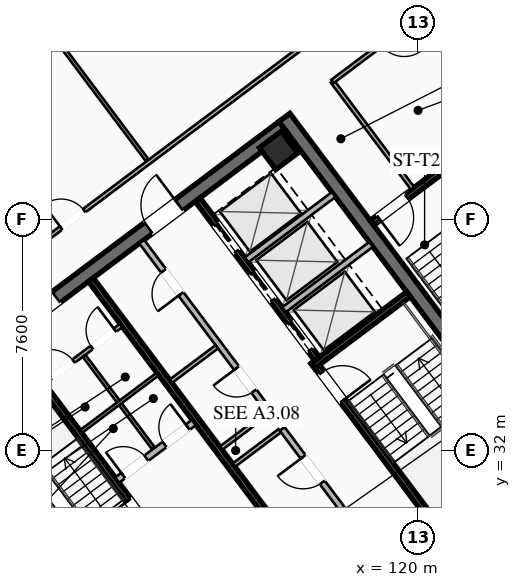
"""IFC4 building model, lengths in metres.
Left out: names, types, materials, properties, quantities, classifications, styles, units other than length and angle.
Written with IfcOpenShell. Run it as: python <this file> out.ifc"""

import sys

from ifc_helpers import new_model, si_unit, direction, frame, frame_2d, origin, origin_2d, place, context, subcontext, project, spatial, rectangle, hollow_rectangle, extrude, element, fill, save


model = new_model("IFC4")
c1 = context("Model", 3, precision=1e-05, world=origin(), true_north=direction((0.0, 1.0)))
c2 = subcontext(c1, "Body", "Model", "MODEL_VIEW")
j1 = project(units=[si_unit("LENGTHUNIT", "METRE"), si_unit("PLANEANGLEUNIT", "RADIAN")], contexts=[c1])
p1 = place(None, origin())
s1 = spatial("IfcSite", under=j1, at=p1, CompositionType="ELEMENT")
p2 = place(p1, origin())
s2 = spatial("IfcBuilding", under=s1, at=p2, CompositionType="ELEMENT")
p3 = place(p2, frame((0.0, 0.0, 204.2)))
s3 = spatial("IfcBuildingStorey", under=s2, at=p3, CompositionType="ELEMENT", Elevation=204.2)
for number, where, z_axis, x_axis in (
    (1, (112.396, 21.047, 0.0), (0.0, 0.0, 1.0), (-0.6, 0.8, 0.0)),
    (2, (115.604, 42.953, 0.0), (0.0, 0.0, 1.0), (0.6, -0.8, 0.0)),
):
    element("IfcWall", number, at=place(p3, frame(where, z_axis=z_axis, x_axis=x_axis)), inside=s3, PredefinedType="SHEAR", context=c2, shape_type="SweptSolid", body=[
        extrude(rectangle(XDim=15.6, YDim=0.45, at=frame_2d((7.8, 0.0))), origin(), (0.0, 0.0, 1.0), 3.55),
    ])
p4 = place(p3, frame((124.649, 30.518, 0.0), z_axis=(0.0, 0.0, 1.0), x_axis=(-0.8, -0.6, 0.0)))
e3 = element("IfcWall", 3, at=p4, inside=s3, PredefinedType="SHEAR", context=c2, shape_type="SweptSolid", body=[
    extrude(rectangle(XDim=15.26, YDim=0.45, at=frame_2d((7.63, 0.0))), origin(), (0.0, 0.0, 1.0), 3.55),
])
p5 = place(p4, frame((9.33, 0.0, 0.0)))
e4 = element("IfcOpeningElement", 4, at=p5, cuts=e3, PredefinedType="OPENING", context=c2, shape_type="SweptSolid", body=[
    extrude(rectangle(XDim=1.25, YDim=2.25, at=frame_2d((0.625, 1.125))), frame((0.0, 0.235, 0.0), z_axis=(0.0, -1.0, 0.0), x_axis=(1.0, 0.0, 0.0)), (0.0, 0.0, 1.0), 0.47),
])
p6 = place(p4, frame((4.28, 0.0, 0.0)))
e5 = element("IfcOpeningElement", 5, at=p6, cuts=e3, PredefinedType="OPENING", context=c2, shape_type="SweptSolid", body=[
    extrude(rectangle(XDim=1.25, YDim=2.25, at=frame_2d((0.625, 1.125))), frame((0.0, 0.235, 0.0), z_axis=(0.0, -1.0, 0.0), x_axis=(1.0, 0.0, 0.0)), (0.0, 0.0, 1.0), 0.47),
])
p7 = place(p3, frame((103.351, 33.482, 0.0), z_axis=(0.0, 0.0, 1.0), x_axis=(0.8, 0.6, 0.0)))
e6 = element("IfcWall", 6, at=p7, inside=s3, PredefinedType="SHEAR", context=c2, shape_type="SweptSolid", body=[
    extrude(rectangle(XDim=15.26, YDim=0.45, at=frame_2d((7.63, 0.0))), origin(), (0.0, 0.0, 1.0), 3.55),
])
p8 = place(p7, frame((4.68, 0.0, 0.0)))
e7 = element("IfcOpeningElement", 7, at=p8, cuts=e6, PredefinedType="OPENING", context=c2, shape_type="SweptSolid", body=[
    extrude(rectangle(XDim=1.25, YDim=2.25, at=frame_2d((0.625, 1.125))), frame((0.0, 0.235, 0.0), z_axis=(0.0, -1.0, 0.0), x_axis=(1.0, 0.0, 0.0)), (0.0, 0.0, 1.0), 0.47),
])
p9 = place(p7, frame((9.73, 0.0, 0.0)))
e8 = element("IfcOpeningElement", 8, at=p9, cuts=e6, PredefinedType="OPENING", context=c2, shape_type="SweptSolid", body=[
    extrude(rectangle(XDim=1.25, YDim=2.25, at=frame_2d((0.625, 1.125))), frame((0.0, 0.235, 0.0), z_axis=(0.0, -1.0, 0.0), x_axis=(1.0, 0.0, 0.0)), (0.0, 0.0, 1.0), 0.47),
])
p10 = place(p3, frame((115.41, 41.87, 0.0), z_axis=(0.0, 0.0, 1.0), x_axis=(0.799999996291, 0.600000004945, 0.0)))
e9 = element("IfcColumn", 9, at=p10, inside=s3, PredefinedType="COLUMN", context=c2, shape_type="SweptSolid", body=[
    extrude(hollow_rectangle(XDim=0.9, YDim=0.9, WallThickness=0.04, at=origin_2d()), origin(), (0.0, 0.0, 1.0), 3.37),
])
p11 = place(p3, frame((111.44, 29.08, 0.0), z_axis=(0.0, 0.0, 1.0), x_axis=(-0.59999041401, 0.800007189403, 0.0)))
e10 = element("IfcWall", 10, at=p11, inside=s3, PredefinedType="SHEAR", context=c2, shape_type="SweptSolid", body=[
    extrude(rectangle(XDim=8.15, YDim=0.2, at=frame_2d((4.075, 0.0))), origin(), (0.0, 0.0, 1.0), 3.37),
])
p12 = place(p11, frame((0.45, 0.0, 0.0)))
e11 = element("IfcOpeningElement", 11, at=p12, cuts=e10, PredefinedType="OPENING", context=c2, shape_type="SweptSolid", body=[
    extrude(rectangle(XDim=1.15, YDim=2.2, at=frame_2d((0.575, 1.1))), frame((0.0, 0.11, 0.0), z_axis=(0.0, -1.0, 0.0), x_axis=(1.0, 0.0, 0.0)), (0.0, 0.0, 1.0), 0.22),
])
p13 = place(p3, frame((116.56, 34.92, 0.0), z_axis=(0.0, 0.0, 1.0), x_axis=(0.59999041401, -0.800007189403, 0.0)))
e12 = element("IfcWall", 12, at=p13, inside=s3, PredefinedType="SHEAR", context=c2, shape_type="SweptSolid", body=[
    extrude(rectangle(XDim=8.15, YDim=0.2, at=frame_2d((4.075, 0.0))), origin(), (0.0, 0.0, 1.0), 3.37),
])
p14 = place(p13, frame((0.45, 0.0, 0.0)))
e13 = element("IfcOpeningElement", 13, at=p14, cuts=e12, PredefinedType="OPENING", context=c2, shape_type="SweptSolid", body=[
    extrude(rectangle(XDim=1.15, YDim=2.2, at=frame_2d((0.575, 1.1))), frame((0.0, 0.11, 0.0), z_axis=(0.0, -1.0, 0.0), x_axis=(1.0, 0.0, 0.0)), (0.0, 0.0, 1.0), 0.22),
])
p15 = place(p3, frame((116.54, 34.78, 0.0), z_axis=(0.0, 0.0, 1.0), x_axis=(0.800014909178, 0.599980120581, 0.0)))
e14 = element("IfcWall", 14, at=p15, inside=s3, PredefinedType="SHEAR", context=c2, shape_type="SweptSolid", body=[
    extrude(rectangle(XDim=3.93, YDim=0.2, at=frame_2d((1.965, 0.0))), origin(), (0.0, 0.0, 1.0), 3.37),
])
p16 = place(p3, frame((118.058, 25.856, 0.0), z_axis=(0.0, 0.0, 1.0), x_axis=(-0.600002657301, 0.799998007018, 0.0)))
e15 = element("IfcWall", 15, at=p16, inside=s3, PredefinedType="SHEAR", context=c2, shape_type="SweptSolid", body=[
    extrude(rectangle(XDim=14.7, YDim=0.2, at=frame_2d((7.35, 0.0))), origin(), (0.0, 0.0, 1.0), 3.37),
])
p17 = place(p3, frame((110.104, 31.028, 0.0), z_axis=(0.0, 0.0, 1.0), x_axis=(0.800018601094, 0.59997519774, 0.0)))
e16 = element("IfcWall", 16, at=p17, inside=s3, PredefinedType="SOLIDWALL", context=c2, shape_type="SweptSolid", body=[
    extrude(rectangle(XDim=3.15, YDim=0.22, at=frame_2d((1.575, 0.0))), origin(), (0.0, 0.0, 1.0), 2.723),
])
p18 = place(p17, frame((0.25, 0.0, 0.0)))
e17 = element("IfcOpeningElement", 17, at=p18, cuts=e16, PredefinedType="OPENING", context=c2, shape_type="SweptSolid", body=[
    extrude(rectangle(XDim=0.95, YDim=2.05, at=frame_2d((0.475, 1.025))), frame((0.0, 0.12, 0.0), z_axis=(0.0, -1.0, 0.0), x_axis=(1.0, 0.0, 0.0)), (0.0, 0.0, 1.0), 0.24),
])
p19 = place(p17, frame((1.95, 0.0, 0.0)))
e18 = element("IfcOpeningElement", 18, at=p19, cuts=e16, PredefinedType="OPENING", context=c2, shape_type="SweptSolid", body=[
    extrude(rectangle(XDim=0.95, YDim=2.05, at=frame_2d((0.475, 1.025))), frame((0.0, 0.12, 0.0), z_axis=(0.0, -1.0, 0.0), x_axis=(1.0, 0.0, 0.0)), (0.0, 0.0, 1.0), 0.24),
])
p20 = place(p3, frame((112.75, 40.25, 0.0), z_axis=(0.0, 0.0, 1.0), x_axis=(0.599994036198, -0.800004472816, 0.0)))
e19 = element("IfcWall", 19, at=p20, inside=s3, PredefinedType="SHEAR", context=c2, shape_type="SweptSolid", body=[
    extrude(rectangle(XDim=6.55, YDim=0.2, at=frame_2d((3.275, 0.0))), origin(), (0.0, 0.0, 1.0), 3.37),
])
p21 = place(p20, frame((5.075, 0.0, 0.0)))
e20 = element("IfcOpeningElement", 20, at=p21, cuts=e19, PredefinedType="OPENING", context=c2, shape_type="SweptSolid", body=[
    extrude(rectangle(XDim=1.1, YDim=2.2, at=frame_2d((0.55, 1.1))), frame((0.0, 0.11, 0.0), z_axis=(0.0, -1.0, 0.0), x_axis=(1.0, 0.0, 0.0)), (0.0, 0.0, 1.0), 0.22),
])
p22 = place(p20, frame((3.025, 0.0, 0.0)))
e21 = element("IfcOpeningElement", 21, at=p22, cuts=e19, PredefinedType="OPENING", context=c2, shape_type="SweptSolid", body=[
    extrude(rectangle(XDim=1.1, YDim=2.2, at=frame_2d((0.55, 1.1))), frame((0.0, 0.11, 0.0), z_axis=(0.0, -1.0, 0.0), x_axis=(1.0, 0.0, 0.0)), (0.0, 0.0, 1.0), 0.22),
])
p23 = place(p20, frame((1.025, 0.0, 0.0)))
e22 = element("IfcOpeningElement", 22, at=p23, cuts=e19, PredefinedType="OPENING", context=c2, shape_type="SweptSolid", body=[
    extrude(rectangle(XDim=1.1, YDim=2.2, at=frame_2d((0.55, 1.1))), frame((0.0, 0.11, 0.0), z_axis=(0.0, -1.0, 0.0), x_axis=(1.0, 0.0, 0.0)), (0.0, 0.0, 1.0), 0.22),
])
for number, where, z_axis, x_axis in (
    (23, (115.59, 36.63, 0.0), (0.0, 0.0, 1.0), (0.8, 0.6, 0.0)),
    (24, (114.36, 38.27, 0.0), (0.0, 0.0, 1.0), (0.8, 0.6, 0.0)),
):
    element("IfcWall", number, at=place(p3, frame(where, z_axis=z_axis, x_axis=x_axis)), inside=s3, PredefinedType="SOLIDWALL", context=c2, shape_type="SweptSolid", body=[
        extrude(rectangle(XDim=3.58, YDim=0.2, at=frame_2d((1.79, 0.0))), origin(), (0.0, 0.0, 1.0), 3.37),
    ])
p24 = place(p3, frame((107.71, 34.22, 0.0), z_axis=(0.0, 0.0, 1.0), x_axis=(0.799981399002, 0.60002480053, 0.0)))
e25 = element("IfcWall", 25, at=p24, inside=s3, PredefinedType="PARTITIONING", context=c2, shape_type="SweptSolid", body=[
    extrude(rectangle(XDim=3.15, YDim=0.135, at=frame_2d((1.575, 0.0))), origin(), (0.0, 0.0, 1.0), 2.723),
])
p25 = place(p24, frame((0.25, 0.0, 0.0)))
e26 = element("IfcOpeningElement", 26, at=p25, cuts=e25, PredefinedType="OPENING", context=c2, shape_type="SweptSolid", body=[
    extrude(rectangle(XDim=0.95, YDim=2.05, at=frame_2d((0.475, 1.025))), frame((0.0, 0.077, 0.0), z_axis=(0.0, -1.0, 0.0), x_axis=(1.0, 0.0, 0.0)), (0.0, 0.0, 1.0), 0.155),
])
p26 = place(p24, frame((1.95, 0.0, 0.0)))
e27 = element("IfcOpeningElement", 27, at=p26, cuts=e25, PredefinedType="OPENING", context=c2, shape_type="SweptSolid", body=[
    extrude(rectangle(XDim=0.95, YDim=2.05, at=frame_2d((0.475, 1.025))), frame((0.0, 0.077, 0.0), z_axis=(0.0, -1.0, 0.0), x_axis=(1.0, 0.0, 0.0)), (0.0, 0.0, 1.0), 0.155),
])
p27 = place(p3, frame((111.296, 32.072, 0.0), z_axis=(0.0, 0.0, 1.0), x_axis=(-0.59995887973, 0.800030838552, 0.0)))
e28 = element("IfcWall", 28, at=p27, inside=s3, PredefinedType="PARTITIONING", context=c2, shape_type="SweptSolid", body=[
    extrude(rectangle(XDim=3.8, YDim=0.11, at=frame_2d((1.9, 0.0))), origin(), (0.0, 0.0, 1.0), 2.723),
])
p28 = place(p3, frame((108.91, 32.62, 0.0), z_axis=(0.0, 0.0, 1.0), x_axis=(0.800018601094, 0.59997519774, 0.0)))
e29 = element("IfcWall", 29, at=p28, inside=s3, PredefinedType="PARTITIONING", context=c2, shape_type="SweptSolid", body=[
    extrude(rectangle(XDim=3.15, YDim=0.11, at=frame_2d((1.575, 0.0))), origin(), (0.0, 0.0, 1.0), 2.723),
])
p29 = place(p3, frame((119.73, 27.11, 0.0), z_axis=(0.0, 0.0, 1.0), x_axis=(-0.600005580459, 0.799995814625, 0.0)))
e30 = element("IfcWall", 30, at=p29, inside=s3, PredefinedType="SOLIDWALL", context=c2, shape_type="SweptSolid", body=[
    extrude(rectangle(XDim=7.0, YDim=0.2, at=frame_2d((3.5, 0.0))), origin(), (0.0, 0.0, 1.0), 2.723),
])
p30 = place(p29, frame((0.85, 0.0, 0.0)))
e31 = element("IfcOpeningElement", 31, at=p30, cuts=e30, PredefinedType="OPENING", context=c2, shape_type="SweptSolid", body=[
    extrude(rectangle(XDim=0.95, YDim=2.05, at=frame_2d((0.475, 1.025))), frame((0.0, 0.11, 0.0), z_axis=(0.0, -1.0, 0.0), x_axis=(1.0, 0.0, 0.0)), (0.0, 0.0, 1.0), 0.22),
])
p31 = place(p29, frame((4.8, 0.0, 0.0)))
e32 = element("IfcOpeningElement", 32, at=p31, cuts=e30, PredefinedType="OPENING", context=c2, shape_type="SweptSolid", body=[
    extrude(rectangle(XDim=1.05, YDim=2.2, at=frame_2d((0.525, 1.1))), frame((0.0, 0.11, 0.0), z_axis=(0.0, -1.0, 0.0), x_axis=(1.0, 0.0, 0.0)), (0.0, 0.0, 1.0), 0.22),
])
p32 = place(p3, frame((113.946, 31.522, 0.0), z_axis=(0.0, 0.0, 1.0), x_axis=(0.8, 0.6, 0.0)))
e33 = element("IfcWall", 33, at=p32, inside=s3, PredefinedType="PARTITIONING", context=c2, shape_type="SweptSolid", body=[
    extrude(rectangle(XDim=1.88, YDim=0.135, at=frame_2d((0.94, 0.0))), origin(), (0.0, 0.0, 1.0), 2.723),
])
p33 = place(p3, frame((115.11, 33.27, 0.0), z_axis=(0.0, 0.0, 1.0), x_axis=(-0.600011160345, 0.79999162962, 0.0)))
e34 = element("IfcWall", 34, at=p33, inside=s3, PredefinedType="SOLIDWALL", context=c2, shape_type="SweptSolid", body=[
    extrude(rectangle(XDim=7.0, YDim=0.2, at=frame_2d((3.5, 0.0))), origin(), (0.0, 0.0, 1.0), 2.723),
])
p34 = place(p33, frame((0.85, 0.0, 0.0)))
e35 = element("IfcOpeningElement", 35, at=p34, cuts=e34, PredefinedType="OPENING", context=c2, shape_type="SweptSolid", body=[
    extrude(rectangle(XDim=0.95, YDim=2.05, at=frame_2d((0.475, 1.025))), frame((0.0, 0.11, 0.0), z_axis=(0.0, -1.0, 0.0), x_axis=(1.0, 0.0, 0.0)), (0.0, 0.0, 1.0), 0.22),
])
p35 = place(p33, frame((4.85, 0.0, 0.0)))
e36 = element("IfcOpeningElement", 36, at=p35, cuts=e34, PredefinedType="OPENING", context=c2, shape_type="SweptSolid", body=[
    extrude(rectangle(XDim=0.95, YDim=2.05, at=frame_2d((0.475, 1.025))), frame((0.0, 0.11, 0.0), z_axis=(0.0, -1.0, 0.0), x_axis=(1.0, 0.0, 0.0)), (0.0, 0.0, 1.0), 0.22),
])
p36 = place(p3, frame((113.526, 32.082, 0.0), z_axis=(0.0, 0.0, 1.0), x_axis=(0.800046745961, 0.599937666993, 0.0)))
e37 = element("IfcWall", 37, at=p36, inside=s3, PredefinedType="PARTITIONING", context=c2, shape_type="SweptSolid", body=[
    extrude(rectangle(XDim=1.88, YDim=0.135, at=frame_2d((0.94, 0.0))), origin(), (0.0, 0.0, 1.0), 2.723),
])
p37 = place(p3, frame((111.876, 34.282, 0.0), z_axis=(0.0, 0.0, 1.0), x_axis=(0.8, 0.6, 0.0)))
e38 = element("IfcWall", 38, at=p37, inside=s3, PredefinedType="PARTITIONING", context=c2, shape_type="SweptSolid", body=[
    extrude(rectangle(XDim=1.88, YDim=0.135, at=frame_2d((0.94, 0.0))), origin(), (0.0, 0.0, 1.0), 2.723),
])
p38 = place(p3, frame((121.204, 41.528, 0.0), z_axis=(0.0, 0.0, 1.0), x_axis=(-0.800017232136, -0.599977023131, 0.0)))
e39 = element("IfcWall", 39, at=p38, inside=s3, PredefinedType="SHEAR", context=c2, shape_type="SweptSolid", body=[
    extrude(rectangle(XDim=3.4, YDim=0.2, at=frame_2d((1.7, 0.0))), origin(), (0.0, 0.0, 1.0), 3.37),
])
p39 = place(p38, frame((1.975, 0.0, 0.0)))
e40 = element("IfcOpeningElement", 40, at=p39, cuts=e39, PredefinedType="OPENING", context=c2, shape_type="SweptSolid", body=[
    extrude(rectangle(XDim=1.15, YDim=2.2, at=frame_2d((0.575, 1.1))), frame((0.0, 0.11, 0.0), z_axis=(0.0, -1.0, 0.0), x_axis=(1.0, 0.0, 0.0)), (0.0, 0.0, 1.0), 0.22),
])
p40 = place(p3, frame((119.824, 40.618, 0.0), z_axis=(0.0, 0.0, 1.0), x_axis=(-0.599982243973, 0.800013316712, 0.0)))
e41 = element("IfcWall", 41, at=p40, inside=s3, PredefinedType="PARTITIONING", context=c2, shape_type="SweptSolid", body=[
    extrude(rectangle(XDim=4.4, YDim=0.135, at=frame_2d((2.2, 0.0))), origin(), (0.0, 0.0, 1.0), 2.723),
])
p41 = place(p3, frame((100.756, 33.692, 0.0), z_axis=(0.0, 0.0, 1.0), x_axis=(0.799998716732, 0.60000171102, 0.0)))
e42 = element("IfcWall", 42, at=p41, inside=s3, PredefinedType="PARTITIONING", context=c2, shape_type="SweptSolid", body=[
    extrude(rectangle(XDim=22.83, YDim=0.135, at=frame_2d((11.415, 0.0))), origin(), (0.0, 0.0, 1.0), 2.723),
])
p42 = place(p41, frame((9.38, 0.0, 0.0)))
e43 = element("IfcOpeningElement", 43, at=p42, cuts=e42, PredefinedType="OPENING", context=c2, shape_type="SweptSolid", body=[
    extrude(rectangle(XDim=0.95, YDim=2.05, at=frame_2d((0.475, 1.025))), frame((0.0, 0.077, 0.0), z_axis=(0.0, -1.0, 0.0), x_axis=(1.0, 0.0, 0.0)), (0.0, 0.0, 1.0), 0.155),
])
p43 = place(p41, frame((21.58, 0.0, 0.0)))
e44 = element("IfcOpeningElement", 44, at=p43, cuts=e42, PredefinedType="OPENING", context=c2, shape_type="SweptSolid", body=[
    extrude(rectangle(XDim=0.95, YDim=2.05, at=frame_2d((0.475, 1.025))), frame((0.0, 0.077, 0.0), z_axis=(0.0, -1.0, 0.0), x_axis=(1.0, 0.0, 0.0)), (0.0, 0.0, 1.0), 0.155),
])
p44 = place(p3, frame((111.092, 41.544, 0.0), z_axis=(0.0, 0.0, 1.0), x_axis=(-0.600006403464, 0.799995197362, 0.0)))
e45 = element("IfcWall", 45, at=p44, inside=s3, PredefinedType="PARTITIONING", context=c2, shape_type="SweptSolid", body=[
    extrude(rectangle(XDim=6.1, YDim=0.11, at=frame_2d((3.05, 0.0))), origin(), (0.0, 0.0, 1.0), 2.723),
])
p45 = place(p3, frame((121.704, 47.528, 0.0), z_axis=(0.0, 0.0, 1.0), x_axis=(-0.799989629485, -0.600013827105, 0.0)))
e46 = element("IfcWall", 46, at=p45, inside=s3, PredefinedType="PARTITIONING", context=c2, shape_type="SweptSolid", body=[
    extrude(rectangle(XDim=5.65, YDim=0.135, at=frame_2d((2.825, 0.0))), origin(), (0.0, 0.0, 1.0), 2.723),
])
p46 = place(p45, frame((2.7, 0.0, 0.0)))
e47 = element("IfcOpeningElement", 47, at=p46, cuts=e46, PredefinedType="OPENING", context=c2, shape_type="SweptSolid", body=[
    extrude(rectangle(XDim=0.95, YDim=2.05, at=frame_2d((0.475, 1.025))), frame((0.0, 0.077, 0.0), z_axis=(0.0, -1.0, 0.0), x_axis=(1.0, 0.0, 0.0)), (0.0, 0.0, 1.0), 0.155),
])
p47 = place(p3, frame((113.23, 17.06, 0.0), z_axis=(0.0, 0.0, 1.0), x_axis=(-0.600003772342, 0.79999717073, 0.0)))
e48 = element("IfcWall", 48, at=p47, inside=s3, PredefinedType="PARTITIONING", context=c2, shape_type="SweptSolid", body=[
    extrude(rectangle(XDim=20.71, YDim=0.135, at=frame_2d((10.355, 0.0))), origin(), (0.0, 0.0, 1.0), 2.723),
])
p48 = place(p47, frame((0.3, 0.0, 0.0)))
e49 = element("IfcOpeningElement", 49, at=p48, cuts=e48, PredefinedType="OPENING", context=c2, shape_type="SweptSolid", body=[
    extrude(rectangle(XDim=0.95, YDim=2.05, at=frame_2d((0.475, 1.025))), frame((0.0, 0.077, 0.0), z_axis=(0.0, -1.0, 0.0), x_axis=(1.0, 0.0, 0.0)), (0.0, 0.0, 1.0), 0.155),
])
p49 = place(p47, frame((11.272, 0.0, 0.0)))
e50 = element("IfcOpeningElement", 50, at=p49, cuts=e48, PredefinedType="OPENING", context=c2, shape_type="SweptSolid", body=[
    extrude(rectangle(XDim=0.95, YDim=2.05, at=frame_2d((0.475, 1.025))), frame((0.0, 0.077, 0.0), z_axis=(0.0, -1.0, 0.0), x_axis=(1.0, 0.0, 0.0)), (0.0, 0.0, 1.0), 0.155),
])
p50 = place(p47, frame((19.46, 0.0, 0.0)))
e51 = element("IfcOpeningElement", 51, at=p50, cuts=e48, PredefinedType="OPENING", context=c2, shape_type="SweptSolid", body=[
    extrude(rectangle(XDim=0.95, YDim=2.05, at=frame_2d((0.475, 1.025))), frame((0.0, 0.077, 0.0), z_axis=(0.0, -1.0, 0.0), x_axis=(1.0, 0.0, 0.0)), (0.0, 0.0, 1.0), 0.155),
])
p51 = place(p8, origin())
e52 = element("IfcDoor", 52, at=p51, inside=s3, OperationType="SINGLE_SWING_LEFT", PredefinedType="DOOR", context=c2, shape_type="SweptSolid", body=[
    extrude(rectangle(XDim=1.25, YDim=2.25, at=frame_2d((0.625, 1.125))), frame((0.0, 0.025, 0.0), z_axis=(0.0, -1.0, 0.0), x_axis=(1.0, 0.0, 0.0)), (0.0, 0.0, 1.0), 0.05),
])
fill(e7, e52)
p52 = place(p9, origin())
e53 = element("IfcDoor", 53, at=p52, inside=s3, OperationType="SINGLE_SWING_RIGHT", PredefinedType="DOOR", context=c2, shape_type="SweptSolid", body=[
    extrude(rectangle(XDim=1.25, YDim=2.25, at=frame_2d((0.625, 1.125))), frame((0.0, 0.025, 0.0), z_axis=(0.0, -1.0, 0.0), x_axis=(1.0, 0.0, 0.0)), (0.0, 0.0, 1.0), 0.05),
])
fill(e8, e53)
p53 = place(p12, origin())
e54 = element("IfcDoor", 54, at=p53, inside=s3, OperationType="SINGLE_SWING_RIGHT", PredefinedType="DOOR", context=c2, shape_type="SweptSolid", body=[
    extrude(rectangle(XDim=1.15, YDim=2.2, at=frame_2d((0.575, 1.1))), frame((0.0, 0.025, 0.0), z_axis=(0.0, -1.0, 0.0), x_axis=(1.0, 0.0, 0.0)), (0.0, 0.0, 1.0), 0.05),
])
fill(e11, e54)
p54 = place(p14, origin())
e55 = element("IfcDoor", 55, at=p54, inside=s3, OperationType="SINGLE_SWING_RIGHT", PredefinedType="DOOR", context=c2, shape_type="SweptSolid", body=[
    extrude(rectangle(XDim=1.15, YDim=2.2, at=frame_2d((0.575, 1.1))), frame((0.0, 0.025, 0.0), z_axis=(0.0, -1.0, 0.0), x_axis=(1.0, 0.0, 0.0)), (0.0, 0.0, 1.0), 0.05),
])
fill(e13, e55)
p55 = place(p25, origin())
e56 = element("IfcDoor", 56, at=p55, inside=s3, OperationType="SINGLE_SWING_LEFT", PredefinedType="DOOR", context=c2, shape_type="SweptSolid", body=[
    extrude(rectangle(XDim=0.95, YDim=2.05, at=frame_2d((0.475, 1.025))), frame((0.0, 0.025, 0.0), z_axis=(0.0, -1.0, 0.0), x_axis=(1.0, 0.0, 0.0)), (0.0, 0.0, 1.0), 0.05),
])
fill(e26, e56)
p56 = place(p26, origin())
e57 = element("IfcDoor", 57, at=p56, inside=s3, OperationType="SINGLE_SWING_RIGHT", PredefinedType="DOOR", context=c2, shape_type="SweptSolid", body=[
    extrude(rectangle(XDim=0.95, YDim=2.05, at=frame_2d((0.475, 1.025))), frame((0.0, 0.025, 0.0), z_axis=(0.0, -1.0, 0.0), x_axis=(1.0, 0.0, 0.0)), (0.0, 0.0, 1.0), 0.05),
])
fill(e27, e57)
p57 = place(p18, origin())
e58 = element("IfcDoor", 58, at=p57, inside=s3, OperationType="SINGLE_SWING_LEFT", PredefinedType="DOOR", context=c2, shape_type="SweptSolid", body=[
    extrude(rectangle(XDim=0.95, YDim=2.05, at=frame_2d((0.475, 1.025))), frame((0.0, 0.025, 0.0), z_axis=(0.0, -1.0, 0.0), x_axis=(1.0, 0.0, 0.0)), (0.0, 0.0, 1.0), 0.05),
])
fill(e17, e58)
p58 = place(p19, origin())
e59 = element("IfcDoor", 59, at=p58, inside=s3, OperationType="SINGLE_SWING_RIGHT", PredefinedType="DOOR", context=c2, shape_type="SweptSolid", body=[
    extrude(rectangle(XDim=0.95, YDim=2.05, at=frame_2d((0.475, 1.025))), frame((0.0, 0.025, 0.0), z_axis=(0.0, -1.0, 0.0), x_axis=(1.0, 0.0, 0.0)), (0.0, 0.0, 1.0), 0.05),
])
fill(e18, e59)
p59 = place(p31, origin())
e60 = element("IfcDoor", 60, at=p59, inside=s3, OperationType="SINGLE_SWING_RIGHT", PredefinedType="DOOR", context=c2, shape_type="SweptSolid", body=[
    extrude(rectangle(XDim=1.05, YDim=2.2, at=frame_2d((0.525, 1.1))), frame((0.0, 0.025, 0.0), z_axis=(0.0, -1.0, 0.0), x_axis=(1.0, 0.0, 0.0)), (0.0, 0.0, 1.0), 0.05),
])
fill(e32, e60)
p60 = place(p34, origin())
e61 = element("IfcDoor", 61, at=p60, inside=s3, OperationType="SINGLE_SWING_RIGHT", PredefinedType="DOOR", context=c2, shape_type="SweptSolid", body=[
    extrude(rectangle(XDim=0.95, YDim=2.05, at=frame_2d((0.475, 1.025))), frame((0.0, 0.025, 0.0), z_axis=(0.0, -1.0, 0.0), x_axis=(1.0, 0.0, 0.0)), (0.0, 0.0, 1.0), 0.05),
])
fill(e35, e61)
p61 = place(p35, origin())
e62 = element("IfcDoor", 62, at=p61, inside=s3, OperationType="SINGLE_SWING_LEFT", PredefinedType="DOOR", context=c2, shape_type="SweptSolid", body=[
    extrude(rectangle(XDim=0.95, YDim=2.05, at=frame_2d((0.475, 1.025))), frame((0.0, 0.025, 0.0), z_axis=(0.0, -1.0, 0.0), x_axis=(1.0, 0.0, 0.0)), (0.0, 0.0, 1.0), 0.05),
])
fill(e36, e62)
p62 = place(p39, origin())
e63 = element("IfcDoor", 63, at=p62, inside=s3, OperationType="SINGLE_SWING_RIGHT", PredefinedType="DOOR", context=c2, shape_type="SweptSolid", body=[
    extrude(rectangle(XDim=1.15, YDim=2.2, at=frame_2d((0.575, 1.1))), frame((0.0, 0.025, 0.0), z_axis=(0.0, -1.0, 0.0), x_axis=(1.0, 0.0, 0.0)), (0.0, 0.0, 1.0), 0.05),
])
fill(e40, e63)
p63 = place(p42, origin())
e64 = element("IfcDoor", 64, at=p63, inside=s3, OperationType="SINGLE_SWING_LEFT", PredefinedType="DOOR", context=c2, shape_type="SweptSolid", body=[
    extrude(rectangle(XDim=0.95, YDim=2.05, at=frame_2d((0.475, 1.025))), frame((0.0, 0.025, 0.0), z_axis=(0.0, -1.0, 0.0), x_axis=(1.0, 0.0, 0.0)), (0.0, 0.0, 1.0), 0.05),
])
fill(e43, e64)
p64 = place(p21, origin())
e65 = element("IfcDoor", 65, at=p64, inside=s3, OperationType="SLIDING_TO_LEFT", PredefinedType="DOOR", context=c2, shape_type="SweptSolid", body=[
    extrude(rectangle(XDim=1.1, YDim=2.2, at=frame_2d((0.55, 1.1))), frame((0.0, 0.025, 0.0), z_axis=(0.0, -1.0, 0.0), x_axis=(1.0, 0.0, 0.0)), (0.0, 0.0, 1.0), 0.05),
])
fill(e20, e65)
p65 = place(p22, origin())
e66 = element("IfcDoor", 66, at=p65, inside=s3, OperationType="SLIDING_TO_LEFT", PredefinedType="DOOR", context=c2, shape_type="SweptSolid", body=[
    extrude(rectangle(XDim=1.1, YDim=2.2, at=frame_2d((0.55, 1.1))), frame((0.0, 0.025, 0.0), z_axis=(0.0, -1.0, 0.0), x_axis=(1.0, 0.0, 0.0)), (0.0, 0.0, 1.0), 0.05),
])
fill(e21, e66)
p66 = place(p23, origin())
e67 = element("IfcDoor", 67, at=p66, inside=s3, OperationType="SLIDING_TO_LEFT", PredefinedType="DOOR", context=c2, shape_type="SweptSolid", body=[
    extrude(rectangle(XDim=1.1, YDim=2.2, at=frame_2d((0.55, 1.1))), frame((0.0, 0.025, 0.0), z_axis=(0.0, -1.0, 0.0), x_axis=(1.0, 0.0, 0.0)), (0.0, 0.0, 1.0), 0.05),
])
fill(e22, e67)
save(model, sys.argv[1])
